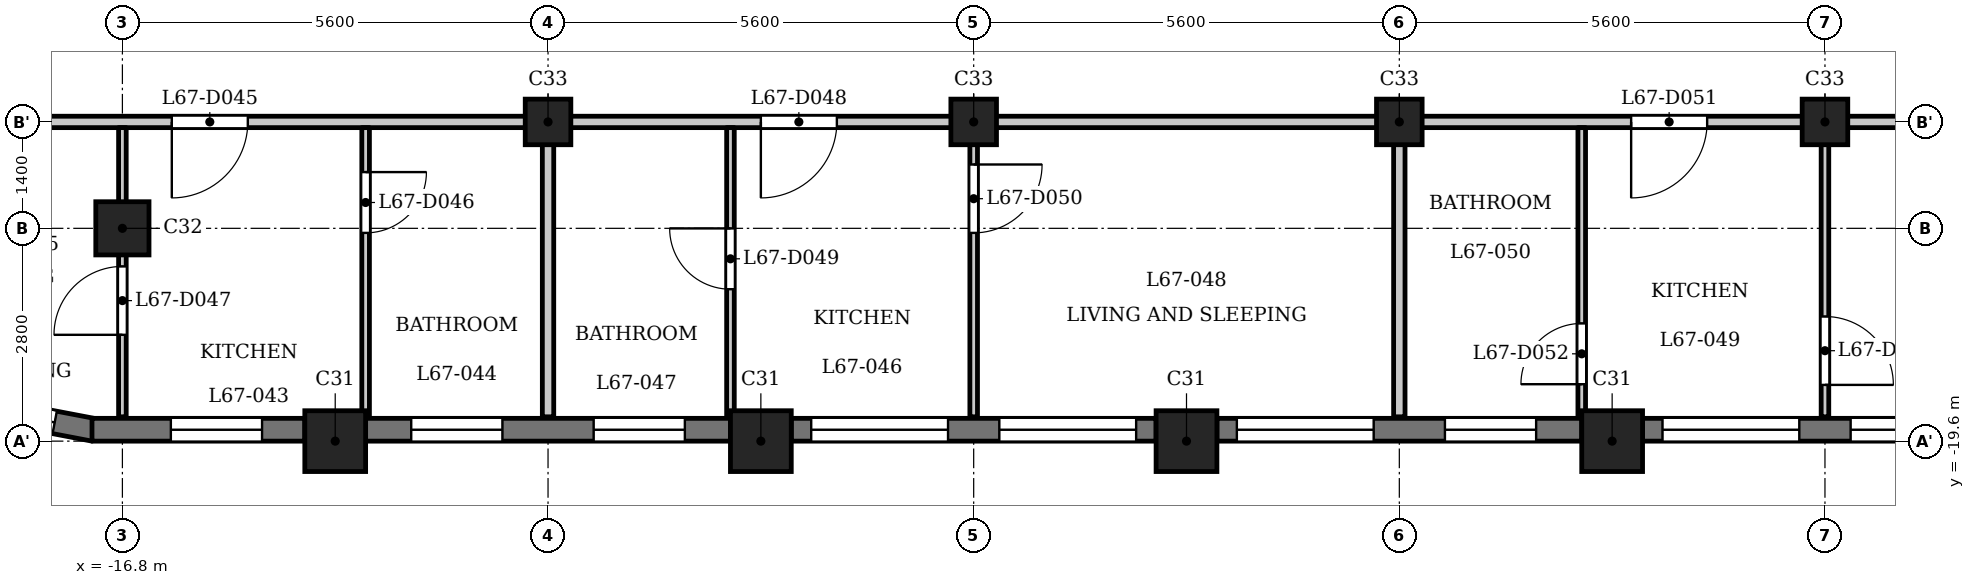
"""IFC4 building model, lengths in metres.
Left out: names, types, materials, properties, quantities, classifications, styles, units other than length and angle.
Written with IfcOpenShell. Run it as: python <this file> out.ifc"""

import sys

from ifc_helpers import new_model, si_unit, direction, frame, frame_2d, origin, origin_2d, place, context, subcontext, project, spatial, rectangle, extrude, element, fill, save


model = new_model("IFC4")
c1 = context("Model", 3, precision=1e-05, world=origin(), true_north=direction((0.0, 1.0)))
c2 = subcontext(c1, "Body", "Model", "MODEL_VIEW")
j1 = project(units=[si_unit("LENGTHUNIT", "METRE"), si_unit("PLANEANGLEUNIT", "RADIAN")], contexts=[c1])
p1 = place(None, origin())
s1 = spatial("IfcSite", under=j1, at=p1, CompositionType="ELEMENT")
p2 = place(p1, origin())
s2 = spatial("IfcBuilding", under=s1, at=p2, CompositionType="ELEMENT")
p3 = place(p2, frame((0.0, 0.0, 259.2)))
s3 = spatial("IfcBuildingStorey", under=s2, at=p3, CompositionType="ELEMENT", Elevation=259.2)
for number, where, z_axis, x_axis in (
    (1, (-14.0, -19.6, 0.0), (0.0, 0.0, 1.0), (1.0, 0.0, 0.0)),
    (2, (-8.4, -19.6, 0.0), (0.0, 0.0, 1.0), (1.0, 0.0, 0.0)),
    (3, (-2.8, -19.6, 0.0), (0.0, 0.0, 1.0), (1.0, 0.0, 0.0)),
    (4, (2.8, -19.6, 0.0), (0.0, 0.0, 1.0), (1.0, 0.0, 0.0)),
):
    element("IfcColumn", number, at=place(p3, frame(where, z_axis=z_axis, x_axis=x_axis)), inside=s3, PredefinedType="COLUMN", context=c2, shape_type="SweptSolid", body=[
        extrude(rectangle(XDim=0.8, YDim=0.8, at=origin_2d()), origin(), (0.0, 0.0, 1.0), 3.5),
    ])
p4 = place(p3, frame((-16.8, -16.8, 0.0), z_axis=(0.0, 0.0, 1.0), x_axis=(1.0, 0.0, 0.0)))
e5 = element("IfcColumn", 5, at=p4, inside=s3, PredefinedType="COLUMN", context=c2, shape_type="SweptSolid", body=[
    extrude(rectangle(XDim=0.7, YDim=0.7, at=origin_2d()), origin(), (0.0, 0.0, 1.0), 3.5),
])
for number, where, z_axis, x_axis in (
    (6, (-11.2, -15.4, 0.0), (0.0, 0.0, 1.0), (1.0, 0.0, 0.0)),
    (7, (-5.6, -15.4, 0.0), (0.0, 0.0, 1.0), (1.0, 0.0, 0.0)),
    (8, (0.0, -15.4, 0.0), (0.0, 0.0, 1.0), (1.0, 0.0, 0.0)),
    (9, (5.6, -15.4, 0.0), (0.0, 0.0, 1.0), (1.0, 0.0, 0.0)),
):
    element("IfcColumn", number, at=place(p3, frame(where, z_axis=z_axis, x_axis=x_axis)), inside=s3, PredefinedType="COLUMN", context=c2, shape_type="SweptSolid", body=[
        extrude(rectangle(XDim=0.6, YDim=0.6, at=origin_2d()), origin(), (0.0, 0.0, 1.0), 3.5),
    ])
p5 = place(p3, frame((-18.995, -19.105, 0.0), z_axis=(0.0, 0.0, 1.0), x_axis=(0.982301706131, -0.187305520826, 0.0)))
e10 = element("IfcWall", 10, at=p5, inside=s3, PredefinedType="SOLIDWALL", context=c2, shape_type="SweptSolid", body=[
    extrude(rectangle(XDim=1.856, YDim=0.3, at=frame_2d((0.928, 0.0))), origin(), (0.0, 0.0, 1.0), 2.55),
])
p6 = place(p5, frame((0.528, 0.0, 0.6)))
e11 = element("IfcOpeningElement", 11, at=p6, cuts=e10, PredefinedType="OPENING", context=c2, shape_type="SweptSolid", body=[
    extrude(rectangle(XDim=0.8, YDim=1.55, at=frame_2d((0.4, 0.775))), frame((0.0, 0.16, 0.0), z_axis=(0.0, -1.0, 0.0), x_axis=(1.0, 0.0, 0.0)), (0.0, 0.0, 1.0), 0.32),
])
p7 = place(p3, frame((-17.2, -19.45, 0.0), z_axis=(0.0, 0.0, 1.0), x_axis=(1.0, 0.0, 0.0)))
e12 = element("IfcWall", 12, at=p7, inside=s3, PredefinedType="SOLIDWALL", context=c2, shape_type="SweptSolid", body=[
    extrude(rectangle(XDim=2.8, YDim=0.3, at=frame_2d((1.4, 0.0))), origin(), (0.0, 0.0, 1.0), 2.55),
])
p8 = place(p7, frame((1.038, 0.0, 0.6)))
e13 = element("IfcOpeningElement", 13, at=p8, cuts=e12, PredefinedType="OPENING", context=c2, shape_type="SweptSolid", body=[
    extrude(rectangle(XDim=1.2, YDim=1.55, at=frame_2d((0.6, 0.775))), frame((0.0, 0.16, 0.0), z_axis=(0.0, -1.0, 0.0), x_axis=(1.0, 0.0, 0.0)), (0.0, 0.0, 1.0), 0.32),
])
p9 = place(p3, frame((-13.6, -19.45, 0.0), z_axis=(0.0, 0.0, 1.0), x_axis=(1.0, 0.0, 0.0)))
e14 = element("IfcWall", 14, at=p9, inside=s3, PredefinedType="SOLIDWALL", context=c2, shape_type="SweptSolid", body=[
    extrude(rectangle(XDim=4.8, YDim=0.3, at=frame_2d((2.4, 0.0))), origin(), (0.0, 0.0, 1.0), 2.55),
])
p10 = place(p9, frame((0.6, 0.0, 0.6)))
e15 = element("IfcOpeningElement", 15, at=p10, cuts=e14, PredefinedType="OPENING", context=c2, shape_type="SweptSolid", body=[
    extrude(rectangle(XDim=1.2, YDim=1.55, at=frame_2d((0.6, 0.775))), frame((0.0, 0.16, 0.0), z_axis=(0.0, -1.0, 0.0), x_axis=(1.0, 0.0, 0.0)), (0.0, 0.0, 1.0), 0.32),
])
p11 = place(p9, frame((3.0, 0.0, 0.6)))
e16 = element("IfcOpeningElement", 16, at=p11, cuts=e14, PredefinedType="OPENING", context=c2, shape_type="SweptSolid", body=[
    extrude(rectangle(XDim=1.2, YDim=1.55, at=frame_2d((0.6, 0.775))), frame((0.0, 0.16, 0.0), z_axis=(0.0, -1.0, 0.0), x_axis=(1.0, 0.0, 0.0)), (0.0, 0.0, 1.0), 0.32),
])
p12 = place(p3, frame((-8.0, -19.45, 0.0), z_axis=(0.0, 0.0, 1.0), x_axis=(1.0, 0.0, 0.0)))
e17 = element("IfcWall", 17, at=p12, inside=s3, PredefinedType="SOLIDWALL", context=c2, shape_type="SweptSolid", body=[
    extrude(rectangle(XDim=4.8, YDim=0.3, at=frame_2d((2.4, 0.0))), origin(), (0.0, 0.0, 1.0), 2.55),
])
p13 = place(p12, frame((0.262, 0.0, 0.9)))
e18 = element("IfcOpeningElement", 18, at=p13, cuts=e17, PredefinedType="OPENING", context=c2, shape_type="SweptSolid", body=[
    extrude(rectangle(XDim=1.8, YDim=1.25, at=frame_2d((0.9, 0.625))), frame((0.0, 0.16, 0.0), z_axis=(0.0, -1.0, 0.0), x_axis=(1.0, 0.0, 0.0)), (0.0, 0.0, 1.0), 0.32),
])
p14 = place(p12, frame((2.738, 0.0, 0.9)))
e19 = element("IfcOpeningElement", 19, at=p14, cuts=e17, PredefinedType="OPENING", context=c2, shape_type="SweptSolid", body=[
    extrude(rectangle(XDim=1.8, YDim=1.25, at=frame_2d((0.9, 0.625))), frame((0.0, 0.16, 0.0), z_axis=(0.0, -1.0, 0.0), x_axis=(1.0, 0.0, 0.0)), (0.0, 0.0, 1.0), 0.32),
])
p15 = place(p3, frame((-2.4, -19.45, 0.0), z_axis=(0.0, 0.0, 1.0), x_axis=(1.0, 0.0, 0.0)))
e20 = element("IfcWall", 20, at=p15, inside=s3, PredefinedType="SOLIDWALL", context=c2, shape_type="SweptSolid", body=[
    extrude(rectangle(XDim=4.8, YDim=0.3, at=frame_2d((2.4, 0.0))), origin(), (0.0, 0.0, 1.0), 2.55),
])
p16 = place(p15, frame((0.262, 0.0, 0.9)))
e21 = element("IfcOpeningElement", 21, at=p16, cuts=e20, PredefinedType="OPENING", context=c2, shape_type="SweptSolid", body=[
    extrude(rectangle(XDim=1.8, YDim=1.25, at=frame_2d((0.9, 0.625))), frame((0.0, 0.16, 0.0), z_axis=(0.0, -1.0, 0.0), x_axis=(1.0, 0.0, 0.0)), (0.0, 0.0, 1.0), 0.32),
])
p17 = place(p15, frame((3.0, 0.0, 0.6)))
e22 = element("IfcOpeningElement", 22, at=p17, cuts=e20, PredefinedType="OPENING", context=c2, shape_type="SweptSolid", body=[
    extrude(rectangle(XDim=1.2, YDim=1.55, at=frame_2d((0.6, 0.775))), frame((0.0, 0.16, 0.0), z_axis=(0.0, -1.0, 0.0), x_axis=(1.0, 0.0, 0.0)), (0.0, 0.0, 1.0), 0.32),
])
p18 = place(p3, frame((3.2, -19.45, 0.0), z_axis=(0.0, 0.0, 1.0), x_axis=(1.0, 0.0, 0.0)))
e23 = element("IfcWall", 23, at=p18, inside=s3, PredefinedType="SOLIDWALL", context=c2, shape_type="SweptSolid", body=[
    extrude(rectangle(XDim=4.8, YDim=0.3, at=frame_2d((2.4, 0.0))), origin(), (0.0, 0.0, 1.0), 2.55),
])
p19 = place(p18, frame((0.262, 0.0, 0.9)))
e24 = element("IfcOpeningElement", 24, at=p19, cuts=e23, PredefinedType="OPENING", context=c2, shape_type="SweptSolid", body=[
    extrude(rectangle(XDim=1.8, YDim=1.25, at=frame_2d((0.9, 0.625))), frame((0.0, 0.16, 0.0), z_axis=(0.0, -1.0, 0.0), x_axis=(1.0, 0.0, 0.0)), (0.0, 0.0, 1.0), 0.32),
])
p20 = place(p18, frame((2.738, 0.0, 0.9)))
e25 = element("IfcOpeningElement", 25, at=p20, cuts=e23, PredefinedType="OPENING", context=c2, shape_type="SweptSolid", body=[
    extrude(rectangle(XDim=1.8, YDim=1.25, at=frame_2d((0.9, 0.625))), frame((0.0, 0.16, 0.0), z_axis=(0.0, -1.0, 0.0), x_axis=(1.0, 0.0, 0.0)), (0.0, 0.0, 1.0), 0.32),
])
p21 = place(p3, frame((-23.322, -15.4, 0.0), z_axis=(0.0, 0.0, 1.0), x_axis=(1.0, 0.0, 0.0)))
e26 = element("IfcWall", 26, at=p21, inside=s3, PredefinedType="PARTITIONING", context=c2, shape_type="SweptSolid", body=[
    extrude(rectangle(XDim=46.872, YDim=0.15, at=frame_2d((23.436, 0.0))), origin(), (0.0, 0.0, 1.0), 3.2),
])
p22 = place(p21, frame((7.172, 0.0, 0.0)))
e27 = element("IfcOpeningElement", 27, at=p22, cuts=e26, PredefinedType="OPENING", context=c2, shape_type="SweptSolid", body=[
    extrude(rectangle(XDim=1.0, YDim=2.1, at=frame_2d((0.5, 1.05))), frame((0.0, 0.085, 0.0), z_axis=(0.0, -1.0, 0.0), x_axis=(1.0, 0.0, 0.0)), (0.0, 0.0, 1.0), 0.17),
])
p23 = place(p21, frame((14.922, 0.0, 0.0)))
e28 = element("IfcOpeningElement", 28, at=p23, cuts=e26, PredefinedType="OPENING", context=c2, shape_type="SweptSolid", body=[
    extrude(rectangle(XDim=1.0, YDim=2.1, at=frame_2d((0.5, 1.05))), frame((0.0, 0.085, 0.0), z_axis=(0.0, -1.0, 0.0), x_axis=(1.0, 0.0, 0.0)), (0.0, 0.0, 1.0), 0.17),
])
p24 = place(p21, frame((26.372, 0.0, 0.0)))
e29 = element("IfcOpeningElement", 29, at=p24, cuts=e26, PredefinedType="OPENING", context=c2, shape_type="SweptSolid", body=[
    extrude(rectangle(XDim=1.0, YDim=2.1, at=frame_2d((0.5, 1.05))), frame((0.0, 0.085, 0.0), z_axis=(0.0, -1.0, 0.0), x_axis=(1.0, 0.0, 0.0)), (0.0, 0.0, 1.0), 0.17),
])
p25 = place(p21, frame((38.572, 0.0, 0.0)))
e30 = element("IfcOpeningElement", 30, at=p25, cuts=e26, PredefinedType="OPENING", context=c2, shape_type="SweptSolid", body=[
    extrude(rectangle(XDim=1.0, YDim=2.1, at=frame_2d((0.5, 1.05))), frame((0.0, 0.085, 0.0), z_axis=(0.0, -1.0, 0.0), x_axis=(1.0, 0.0, 0.0)), (0.0, 0.0, 1.0), 0.17),
])
p26 = place(p3, frame((-16.8, -19.28, 0.0), z_axis=(0.0, 0.0, 1.0), x_axis=(0.0, 1.0, 0.0)))
e31 = element("IfcWall", 31, at=p26, inside=s3, PredefinedType="PARTITIONING", context=c2, shape_type="SweptSolid", body=[
    extrude(rectangle(XDim=3.805, YDim=0.1, at=frame_2d((1.902, 0.0))), origin(), (0.0, 0.0, 1.0), 3.2),
])
p27 = place(p26, frame((1.079, 0.0, 0.0)))
e32 = element("IfcOpeningElement", 32, at=p27, cuts=e31, PredefinedType="OPENING", context=c2, shape_type="SweptSolid", body=[
    extrude(rectangle(XDim=0.9, YDim=2.1, at=frame_2d((0.45, 1.05))), frame((0.0, 0.06, 0.0), z_axis=(0.0, -1.0, 0.0), x_axis=(1.0, 0.0, 0.0)), (0.0, 0.0, 1.0), 0.12),
])
p28 = place(p3, frame((-13.6, -19.28, 0.0), z_axis=(0.0, 0.0, 1.0), x_axis=(0.0, 1.0, 0.0)))
e33 = element("IfcWall", 33, at=p28, inside=s3, PredefinedType="PARTITIONING", context=c2, shape_type="SweptSolid", body=[
    extrude(rectangle(XDim=3.805, YDim=0.1, at=frame_2d((1.902, 0.0))), origin(), (0.0, 0.0, 1.0), 3.2),
])
p29 = place(p28, frame((2.42, 0.0, 0.0)))
e34 = element("IfcOpeningElement", 34, at=p29, cuts=e33, PredefinedType="OPENING", context=c2, shape_type="SweptSolid", body=[
    extrude(rectangle(XDim=0.8, YDim=2.1, at=frame_2d((0.4, 1.05))), frame((0.0, 0.06, 0.0), z_axis=(0.0, -1.0, 0.0), x_axis=(1.0, 0.0, 0.0)), (0.0, 0.0, 1.0), 0.12),
])
p30 = place(p3, frame((-11.2, -19.28, 0.0), z_axis=(0.0, 0.0, 1.0), x_axis=(0.0, 1.0, 0.0)))
e35 = element("IfcWall", 35, at=p30, inside=s3, PredefinedType="PARTITIONING", context=c2, shape_type="SweptSolid", body=[
    extrude(rectangle(XDim=3.805, YDim=0.15, at=frame_2d((1.902, 0.0))), origin(), (0.0, 0.0, 1.0), 3.2),
])
p31 = place(p3, frame((-8.8, -19.28, 0.0), z_axis=(0.0, 0.0, 1.0), x_axis=(0.0, 1.0, 0.0)))
e36 = element("IfcWall", 36, at=p31, inside=s3, PredefinedType="PARTITIONING", context=c2, shape_type="SweptSolid", body=[
    extrude(rectangle(XDim=3.805, YDim=0.1, at=frame_2d((1.902, 0.0))), origin(), (0.0, 0.0, 1.0), 3.2),
])
p32 = place(p31, frame((1.679, 0.0, 0.0)))
e37 = element("IfcOpeningElement", 37, at=p32, cuts=e36, PredefinedType="OPENING", context=c2, shape_type="SweptSolid", body=[
    extrude(rectangle(XDim=0.8, YDim=2.1, at=frame_2d((0.4, 1.05))), frame((0.0, 0.06, 0.0), z_axis=(0.0, -1.0, 0.0), x_axis=(1.0, 0.0, 0.0)), (0.0, 0.0, 1.0), 0.12),
])
p33 = place(p3, frame((-5.6, -19.28, 0.0), z_axis=(0.0, 0.0, 1.0), x_axis=(0.0, 1.0, 0.0)))
e38 = element("IfcWall", 38, at=p33, inside=s3, PredefinedType="PARTITIONING", context=c2, shape_type="SweptSolid", body=[
    extrude(rectangle(XDim=3.805, YDim=0.1, at=frame_2d((1.902, 0.0))), origin(), (0.0, 0.0, 1.0), 3.2),
])
p34 = place(p33, frame((2.42, 0.0, 0.0)))
e39 = element("IfcOpeningElement", 39, at=p34, cuts=e38, PredefinedType="OPENING", context=c2, shape_type="SweptSolid", body=[
    extrude(rectangle(XDim=0.9, YDim=2.1, at=frame_2d((0.45, 1.05))), frame((0.0, 0.06, 0.0), z_axis=(0.0, -1.0, 0.0), x_axis=(1.0, 0.0, 0.0)), (0.0, 0.0, 1.0), 0.12),
])
p35 = place(p3, frame((0.0, -19.28, 0.0), z_axis=(0.0, 0.0, 1.0), x_axis=(0.0, 1.0, 0.0)))
e40 = element("IfcWall", 40, at=p35, inside=s3, PredefinedType="PARTITIONING", context=c2, shape_type="SweptSolid", body=[
    extrude(rectangle(XDim=3.805, YDim=0.15, at=frame_2d((1.902, 0.0))), origin(), (0.0, 0.0, 1.0), 3.2),
])
p36 = place(p3, frame((2.4, -19.28, 0.0), z_axis=(0.0, 0.0, 1.0), x_axis=(0.0, 1.0, 0.0)))
e41 = element("IfcWall", 41, at=p36, inside=s3, PredefinedType="PARTITIONING", context=c2, shape_type="SweptSolid", body=[
    extrude(rectangle(XDim=3.805, YDim=0.1, at=frame_2d((1.902, 0.0))), origin(), (0.0, 0.0, 1.0), 3.2),
])
p37 = place(p36, frame((0.429, 0.0, 0.0)))
e42 = element("IfcOpeningElement", 42, at=p37, cuts=e41, PredefinedType="OPENING", context=c2, shape_type="SweptSolid", body=[
    extrude(rectangle(XDim=0.8, YDim=2.1, at=frame_2d((0.4, 1.05))), frame((0.0, 0.06, 0.0), z_axis=(0.0, -1.0, 0.0), x_axis=(1.0, 0.0, 0.0)), (0.0, 0.0, 1.0), 0.12),
])
p38 = place(p3, frame((5.6, -19.28, 0.0), z_axis=(0.0, 0.0, 1.0), x_axis=(0.0, 1.0, 0.0)))
e43 = element("IfcWall", 43, at=p38, inside=s3, PredefinedType="PARTITIONING", context=c2, shape_type="SweptSolid", body=[
    extrude(rectangle(XDim=3.805, YDim=0.1, at=frame_2d((1.902, 0.0))), origin(), (0.0, 0.0, 1.0), 3.2),
])
p39 = place(p38, frame((0.42, 0.0, 0.0)))
e44 = element("IfcOpeningElement", 44, at=p39, cuts=e43, PredefinedType="OPENING", context=c2, shape_type="SweptSolid", body=[
    extrude(rectangle(XDim=0.9, YDim=2.1, at=frame_2d((0.45, 1.05))), frame((0.0, 0.06, 0.0), z_axis=(0.0, -1.0, 0.0), x_axis=(1.0, 0.0, 0.0)), (0.0, 0.0, 1.0), 0.12),
])
p40 = place(p22, origin())
e45 = element("IfcDoor", 45, at=p40, inside=s3, OperationType="SINGLE_SWING_LEFT", PredefinedType="DOOR", context=c2, shape_type="SweptSolid", body=[
    extrude(rectangle(XDim=1.0, YDim=2.1, at=frame_2d((0.5, 1.05))), frame((0.0, 0.025, 0.0), z_axis=(0.0, -1.0, 0.0), x_axis=(1.0, 0.0, 0.0)), (0.0, 0.0, 1.0), 0.05),
])
fill(e27, e45)
p41 = place(p29, origin())
e46 = element("IfcDoor", 46, at=p41, inside=s3, OperationType="SINGLE_SWING_RIGHT", PredefinedType="DOOR", context=c2, shape_type="SweptSolid", body=[
    extrude(rectangle(XDim=0.8, YDim=2.1, at=frame_2d((0.4, 1.05))), frame((0.0, 0.025, 0.0), z_axis=(0.0, -1.0, 0.0), x_axis=(1.0, 0.0, 0.0)), (0.0, 0.0, 1.0), 0.05),
])
fill(e34, e46)
p42 = place(p27, origin())
e47 = element("IfcDoor", 47, at=p42, inside=s3, OperationType="SINGLE_SWING_RIGHT", PredefinedType="DOOR", context=c2, shape_type="SweptSolid", body=[
    extrude(rectangle(XDim=0.9, YDim=2.1, at=frame_2d((0.45, 1.05))), frame((0.0, 0.025, 0.0), z_axis=(0.0, -1.0, 0.0), x_axis=(1.0, 0.0, 0.0)), (0.0, 0.0, 1.0), 0.05),
])
fill(e32, e47)
p43 = place(p23, origin())
e48 = element("IfcDoor", 48, at=p43, inside=s3, OperationType="SINGLE_SWING_LEFT", PredefinedType="DOOR", context=c2, shape_type="SweptSolid", body=[
    extrude(rectangle(XDim=1.0, YDim=2.1, at=frame_2d((0.5, 1.05))), frame((0.0, 0.025, 0.0), z_axis=(0.0, -1.0, 0.0), x_axis=(1.0, 0.0, 0.0)), (0.0, 0.0, 1.0), 0.05),
])
fill(e28, e48)
p44 = place(p32, origin())
e49 = element("IfcDoor", 49, at=p44, inside=s3, OperationType="SINGLE_SWING_LEFT", PredefinedType="DOOR", context=c2, shape_type="SweptSolid", body=[
    extrude(rectangle(XDim=0.8, YDim=2.1, at=frame_2d((0.4, 1.05))), frame((0.0, 0.025, 0.0), z_axis=(0.0, -1.0, 0.0), x_axis=(1.0, 0.0, 0.0)), (0.0, 0.0, 1.0), 0.05),
])
fill(e37, e49)
p45 = place(p34, origin())
e50 = element("IfcDoor", 50, at=p45, inside=s3, OperationType="SINGLE_SWING_RIGHT", PredefinedType="DOOR", context=c2, shape_type="SweptSolid", body=[
    extrude(rectangle(XDim=0.9, YDim=2.1, at=frame_2d((0.45, 1.05))), frame((0.0, 0.025, 0.0), z_axis=(0.0, -1.0, 0.0), x_axis=(1.0, 0.0, 0.0)), (0.0, 0.0, 1.0), 0.05),
])
fill(e39, e50)
p46 = place(p24, origin())
e51 = element("IfcDoor", 51, at=p46, inside=s3, OperationType="SINGLE_SWING_LEFT", PredefinedType="DOOR", context=c2, shape_type="SweptSolid", body=[
    extrude(rectangle(XDim=1.0, YDim=2.1, at=frame_2d((0.5, 1.05))), frame((0.0, 0.025, 0.0), z_axis=(0.0, -1.0, 0.0), x_axis=(1.0, 0.0, 0.0)), (0.0, 0.0, 1.0), 0.05),
])
fill(e29, e51)
p47 = place(p37, origin())
e52 = element("IfcDoor", 52, at=p47, inside=s3, OperationType="SINGLE_SWING_RIGHT", PredefinedType="DOOR", context=c2, shape_type="SweptSolid", body=[
    extrude(rectangle(XDim=0.8, YDim=2.1, at=frame_2d((0.4, 1.05))), frame((0.0, 0.025, 0.0), z_axis=(0.0, -1.0, 0.0), x_axis=(1.0, 0.0, 0.0)), (0.0, 0.0, 1.0), 0.05),
])
fill(e42, e52)
p48 = place(p39, origin())
e53 = element("IfcDoor", 53, at=p48, inside=s3, OperationType="SINGLE_SWING_LEFT", PredefinedType="DOOR", context=c2, shape_type="SweptSolid", body=[
    extrude(rectangle(XDim=0.9, YDim=2.1, at=frame_2d((0.45, 1.05))), frame((0.0, 0.025, 0.0), z_axis=(0.0, -1.0, 0.0), x_axis=(1.0, 0.0, 0.0)), (0.0, 0.0, 1.0), 0.05),
])
fill(e44, e53)
p49 = place(p6, origin())
e54 = element("IfcWindow", 54, at=p49, inside=s3, PartitioningType="SINGLE_PANEL", PredefinedType="WINDOW", context=c2, shape_type="SweptSolid", body=[
    extrude(rectangle(XDim=0.8, YDim=1.55, at=frame_2d((0.4, 0.775))), frame((0.0, 0.03, 0.0), z_axis=(0.0, -1.0, 0.0), x_axis=(1.0, 0.0, 0.0)), (0.0, 0.0, 1.0), 0.06),
])
fill(e11, e54)
p50 = place(p8, origin())
e55 = element("IfcWindow", 55, at=p50, inside=s3, PartitioningType="SINGLE_PANEL", PredefinedType="WINDOW", context=c2, shape_type="SweptSolid", body=[
    extrude(rectangle(XDim=1.2, YDim=1.55, at=frame_2d((0.6, 0.775))), frame((0.0, 0.03, 0.0), z_axis=(0.0, -1.0, 0.0), x_axis=(1.0, 0.0, 0.0)), (0.0, 0.0, 1.0), 0.06),
])
fill(e13, e55)
p51 = place(p10, origin())
e56 = element("IfcWindow", 56, at=p51, inside=s3, PartitioningType="SINGLE_PANEL", PredefinedType="WINDOW", context=c2, shape_type="SweptSolid", body=[
    extrude(rectangle(XDim=1.2, YDim=1.55, at=frame_2d((0.6, 0.775))), frame((0.0, 0.03, 0.0), z_axis=(0.0, -1.0, 0.0), x_axis=(1.0, 0.0, 0.0)), (0.0, 0.0, 1.0), 0.06),
])
fill(e15, e56)
p52 = place(p11, origin())
e57 = element("IfcWindow", 57, at=p52, inside=s3, PartitioningType="SINGLE_PANEL", PredefinedType="WINDOW", context=c2, shape_type="SweptSolid", body=[
    extrude(rectangle(XDim=1.2, YDim=1.55, at=frame_2d((0.6, 0.775))), frame((0.0, 0.03, 0.0), z_axis=(0.0, -1.0, 0.0), x_axis=(1.0, 0.0, 0.0)), (0.0, 0.0, 1.0), 0.06),
])
fill(e16, e57)
p53 = place(p13, origin())
e58 = element("IfcWindow", 58, at=p53, inside=s3, PartitioningType="SINGLE_PANEL", PredefinedType="WINDOW", context=c2, shape_type="SweptSolid", body=[
    extrude(rectangle(XDim=1.8, YDim=1.25, at=frame_2d((0.9, 0.625))), frame((0.0, 0.03, 0.0), z_axis=(0.0, -1.0, 0.0), x_axis=(1.0, 0.0, 0.0)), (0.0, 0.0, 1.0), 0.06),
])
fill(e18, e58)
p54 = place(p14, origin())
e59 = element("IfcWindow", 59, at=p54, inside=s3, PartitioningType="SINGLE_PANEL", PredefinedType="WINDOW", context=c2, shape_type="SweptSolid", body=[
    extrude(rectangle(XDim=1.8, YDim=1.25, at=frame_2d((0.9, 0.625))), frame((0.0, 0.03, 0.0), z_axis=(0.0, -1.0, 0.0), x_axis=(1.0, 0.0, 0.0)), (0.0, 0.0, 1.0), 0.06),
])
fill(e19, e59)
p55 = place(p16, origin())
e60 = element("IfcWindow", 60, at=p55, inside=s3, PartitioningType="SINGLE_PANEL", PredefinedType="WINDOW", context=c2, shape_type="SweptSolid", body=[
    extrude(rectangle(XDim=1.8, YDim=1.25, at=frame_2d((0.9, 0.625))), frame((0.0, 0.03, 0.0), z_axis=(0.0, -1.0, 0.0), x_axis=(1.0, 0.0, 0.0)), (0.0, 0.0, 1.0), 0.06),
])
fill(e21, e60)
p56 = place(p17, origin())
e61 = element("IfcWindow", 61, at=p56, inside=s3, PartitioningType="SINGLE_PANEL", PredefinedType="WINDOW", context=c2, shape_type="SweptSolid", body=[
    extrude(rectangle(XDim=1.2, YDim=1.55, at=frame_2d((0.6, 0.775))), frame((0.0, 0.03, 0.0), z_axis=(0.0, -1.0, 0.0), x_axis=(1.0, 0.0, 0.0)), (0.0, 0.0, 1.0), 0.06),
])
fill(e22, e61)
p57 = place(p19, origin())
e62 = element("IfcWindow", 62, at=p57, inside=s3, PartitioningType="SINGLE_PANEL", PredefinedType="WINDOW", context=c2, shape_type="SweptSolid", body=[
    extrude(rectangle(XDim=1.8, YDim=1.25, at=frame_2d((0.9, 0.625))), frame((0.0, 0.03, 0.0), z_axis=(0.0, -1.0, 0.0), x_axis=(1.0, 0.0, 0.0)), (0.0, 0.0, 1.0), 0.06),
])
fill(e24, e62)
p58 = place(p20, origin())
e63 = element("IfcWindow", 63, at=p58, inside=s3, PartitioningType="SINGLE_PANEL", PredefinedType="WINDOW", context=c2, shape_type="SweptSolid", body=[
    extrude(rectangle(XDim=1.8, YDim=1.25, at=frame_2d((0.9, 0.625))), frame((0.0, 0.03, 0.0), z_axis=(0.0, -1.0, 0.0), x_axis=(1.0, 0.0, 0.0)), (0.0, 0.0, 1.0), 0.06),
])
fill(e25, e63)
save(model, sys.argv[1])
